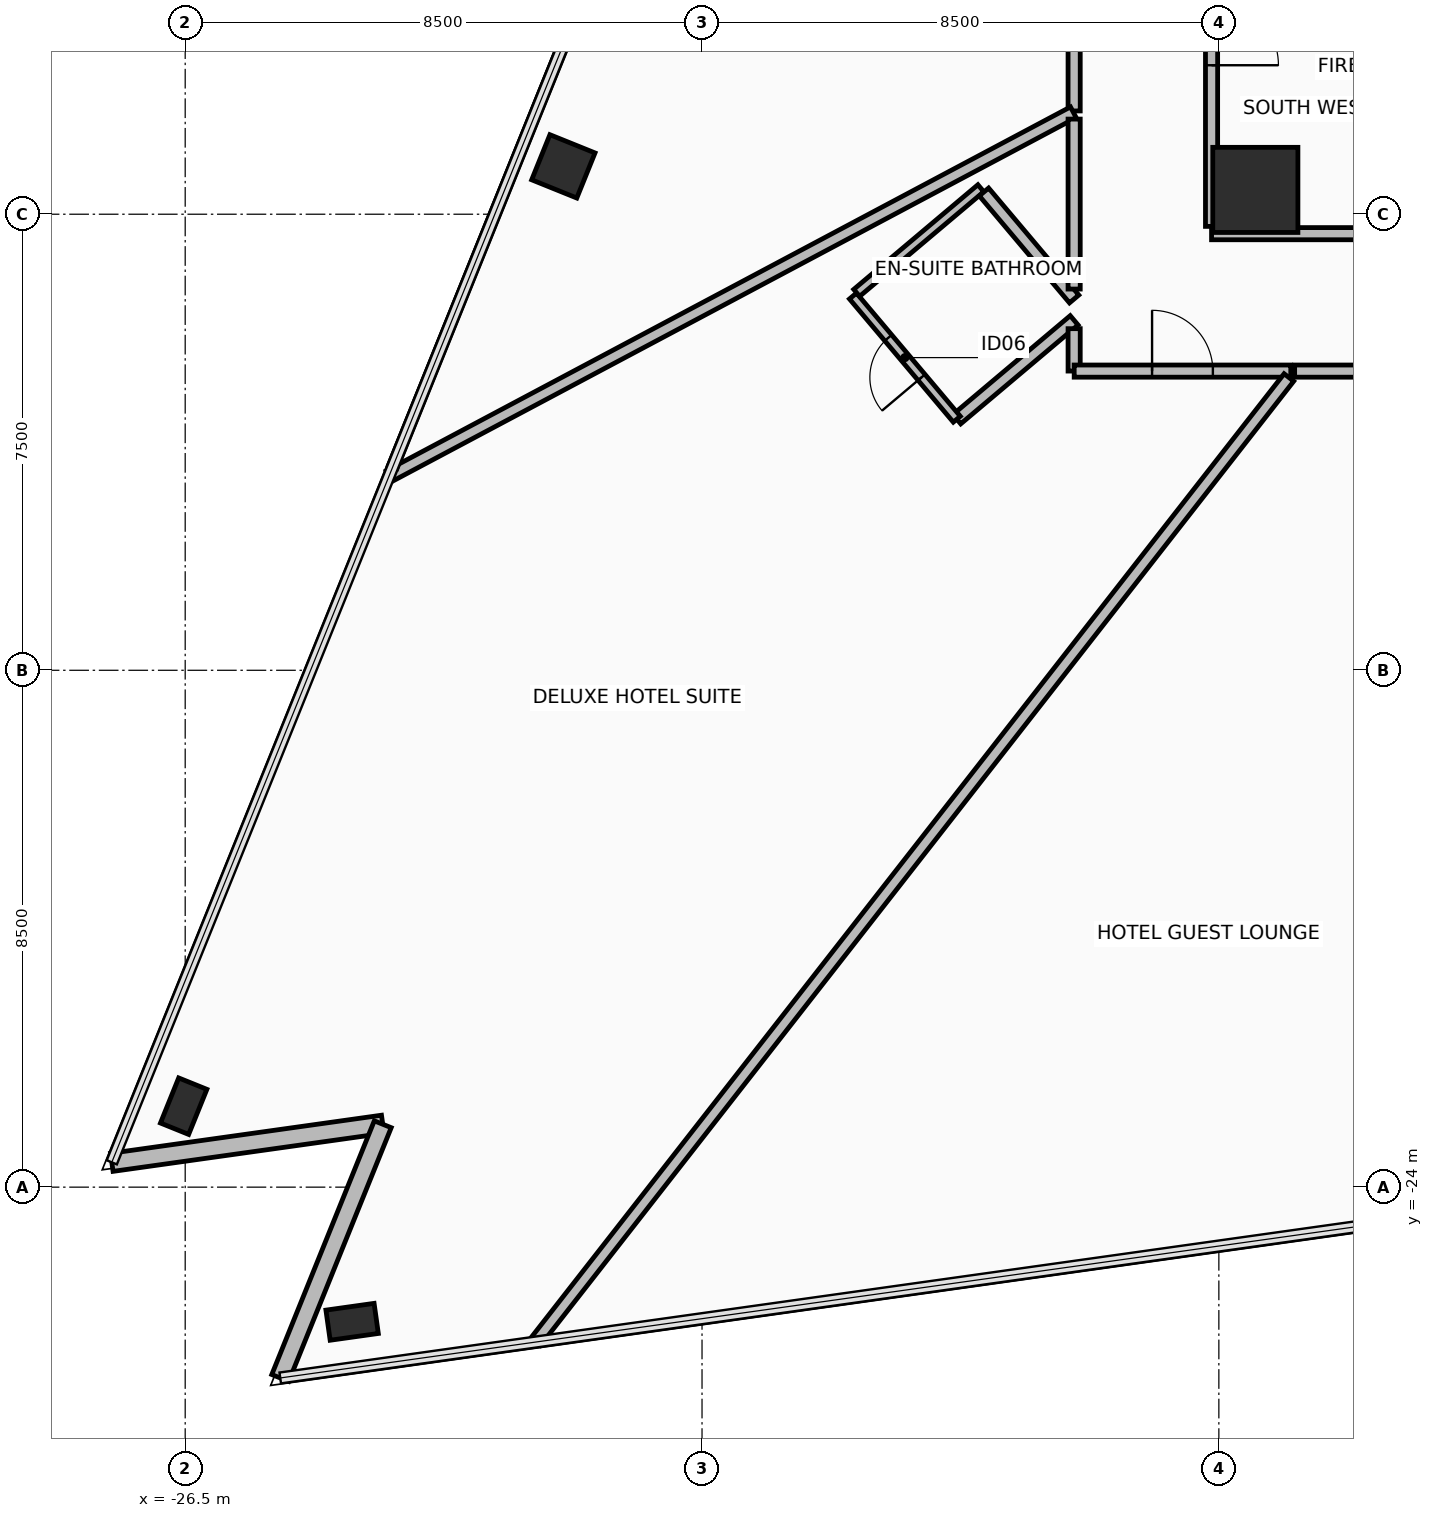
"""IFC4 building model, lengths in metres.
Left out: names, types, materials, properties, quantities, classifications, styles, units other than length and angle.
Written with IfcOpenShell. Run it as: python <this file> out.ifc"""

import sys

from ifc_helpers import new_model, si_unit, direction, frame, frame_2d, origin, origin_2d, place, context, subcontext, project, spatial, rectangle, hollow_rectangle, extrude, element, fill, save


model = new_model("IFC4")
c1 = context("Model", 3, precision=1e-05, world=origin(), true_north=direction((0.0, 1.0)))
c2 = subcontext(c1, "Body", "Model", "MODEL_VIEW")
j1 = project(units=[si_unit("LENGTHUNIT", "METRE"), si_unit("PLANEANGLEUNIT", "RADIAN")], contexts=[c1])
p1 = place(None, origin())
s1 = spatial("IfcSite", under=j1, at=p1, CompositionType="ELEMENT")
p2 = place(p1, origin())
s2 = spatial("IfcBuilding", under=s1, at=p2, CompositionType="ELEMENT")
p3 = place(p2, frame((0.0, 0.0, 67.3)))
s3 = spatial("IfcBuildingStorey", under=s2, at=p3, CompositionType="ELEMENT", Elevation=67.3)
p4 = place(p3, frame((-8.9, -7.6, 0.0), z_axis=(0.0, 0.0, 1.0), x_axis=(1.0, 0.0, 0.0)))
e1 = element("IfcColumn", 1, at=p4, inside=s3, PredefinedType="COLUMN", context=c2, shape_type="SweptSolid", body=[
    extrude(rectangle(XDim=1.4, YDim=1.4, at=origin_2d()), origin(), (0.0, 0.0, 1.0), 3.45),
])
p5 = place(p3, frame((-20.281, -7.213, 0.0), z_axis=(0.0, 0.0, 1.0), x_axis=(0.374608211656, 0.927183200754, 0.0)))
e2 = element("IfcColumn", 2, at=p5, inside=s3, PredefinedType="COLUMN", context=c2, shape_type="SweptSolid", body=[
    extrude(hollow_rectangle(XDim=0.8, YDim=0.8, WallThickness=0.045, at=origin_2d()), origin(), (0.0, 0.0, 1.0), 3.45),
])
for number, where, z_axis, x_axis in (
    (3, (-26.525, -22.668, 0.0), (0.0, 0.0, 1.0), (0.375, 0.927, 0.0)),
    (4, (-23.755, -26.214, 0.0), (0.0, 0.0, 1.0), (0.99, 0.139, 0.0)),
):
    element("IfcColumn", number, at=place(p3, frame(where, z_axis=z_axis, x_axis=x_axis)), inside=s3, PredefinedType="COLUMN", context=c2, shape_type="SweptSolid", body=[
        extrude(hollow_rectangle(XDim=0.5, YDim=0.8, WallThickness=0.04, at=origin_2d()), origin(), (0.0, 0.0, 1.0), 3.45),
    ])
p6 = place(p3, frame((-27.707, -23.592, 0.0), z_axis=(0.0, 0.0, 1.0), x_axis=(0.990269200152, 0.139165050317, 0.0)))
e5 = element("IfcWall", 5, at=p6, inside=s3, PredefinedType="STANDARD", context=c2, shape_type="SweptSolid", body=[
    extrude(rectangle(XDim=4.5, YDim=0.3, at=frame_2d((2.25, 0.0))), origin(), (0.0, 0.0, 1.0), 2.47),
])
p7 = place(p3, frame((-23.251, -22.966, 0.0), z_axis=(0.0, 0.0, 1.0), x_axis=(-0.374568898324, -0.927199083481, 0.0)))
e6 = element("IfcWall", 6, at=p7, inside=s3, PredefinedType="STANDARD", context=c2, shape_type="SweptSolid", body=[
    extrude(rectangle(XDim=4.5, YDim=0.3, at=frame_2d((2.25, 0.0))), origin(), (0.0, 0.0, 1.0), 2.47),
])
p8 = place(p3, frame((-9.62, -8.32, 0.0), z_axis=(0.0, 0.0, 1.0), x_axis=(1.0, 0.0, 0.0)))
e7 = element("IfcWall", 7, at=p8, inside=s3, PredefinedType="PARTITIONING", context=c2, shape_type="SweptSolid", body=[
    extrude(rectangle(XDim=19.24, YDim=0.2, at=frame_2d((9.62, 0.0))), origin(), (0.0, 0.0, 1.0), 2.67),
])
p9 = place(p8, frame((13.97, 0.0, 0.0)))
e8 = element("IfcOpeningElement", 8, at=p9, cuts=e7, PredefinedType="OPENING", context=c2, shape_type="SweptSolid", body=[
    extrude(rectangle(XDim=0.9, YDim=2.1, at=frame_2d((0.45, 1.05))), frame((0.0, 0.11, 0.0), z_axis=(0.0, -1.0, 0.0), x_axis=(1.0, 0.0, 0.0)), (0.0, 0.0, 1.0), 0.22),
])
p10 = place(p3, frame((-9.62, 8.2, 0.0), z_axis=(0.0, 0.0, 1.0), x_axis=(0.0, -1.0, 0.0)))
e9 = element("IfcWall", 9, at=p10, inside=s3, PredefinedType="PARTITIONING", context=c2, shape_type="SweptSolid", body=[
    extrude(rectangle(XDim=16.4, YDim=0.2, at=frame_2d((8.2, 0.0))), origin(), (0.0, 0.0, 1.0), 2.67),
])
p11 = place(p10, frame((12.65, 0.0, 0.0)))
e10 = element("IfcOpeningElement", 10, at=p11, cuts=e9, PredefinedType="OPENING", context=c2, shape_type="SweptSolid", body=[
    extrude(rectangle(XDim=1.1, YDim=2.15, at=frame_2d((0.55, 1.075))), frame((0.0, 0.11, 0.0), z_axis=(0.0, -1.0, 0.0), x_axis=(1.0, 0.0, 0.0)), (0.0, 0.0, 1.0), 0.22),
])
p12 = place(p3, frame((-11.88, -9.745, 0.0), z_axis=(0.0, 0.0, 1.0), x_axis=(-0.764712982519, -0.644371053328, 0.0)))
e11 = element("IfcWall", 11, at=p12, inside=s3, PredefinedType="PARTITIONING", context=c2, shape_type="SweptSolid", body=[
    extrude(rectangle(XDim=2.524, YDim=0.2, at=frame_2d((1.262, 0.0))), origin(), (0.0, 0.0, 1.0), 3.275),
])
p13 = place(p3, frame((-13.81, -11.371, 0.0), z_axis=(0.0, 0.0, 1.0), x_axis=(-0.644478981733, 0.764622025647, 0.0)))
e12 = element("IfcWall", 12, at=p13, inside=s3, PredefinedType="PARTITIONING", context=c2, shape_type="SweptSolid", body=[
    extrude(rectangle(XDim=2.65, YDim=0.15, at=frame_2d((1.325, 0.0))), origin(), (0.0, 0.0, 1.0), 2.87),
])
p14 = place(p13, frame((0.9, 0.0, 0.0)))
e13 = element("IfcOpeningElement", 13, at=p14, cuts=e12, PredefinedType="OPENING", context=c2, shape_type="SweptSolid", body=[
    extrude(rectangle(XDim=0.85, YDim=2.1, at=frame_2d((0.425, 1.05))), frame((0.0, 0.085, 0.0), z_axis=(0.0, -1.0, 0.0), x_axis=(1.0, 0.0, 0.0)), (0.0, 0.0, 1.0), 0.17),
])
p15 = place(p3, frame((-15.456, -9.293, 0.0), z_axis=(0.0, 0.0, 1.0), x_axis=(0.764709608169, 0.644375057846, 0.0)))
e14 = element("IfcWall", 14, at=p15, inside=s3, PredefinedType="PARTITIONING", context=c2, shape_type="SweptSolid", body=[
    extrude(rectangle(XDim=2.67, YDim=0.15, at=frame_2d((1.335, 0.0))), origin(), (0.0, 0.0, 1.0), 2.67),
])
p16 = place(p3, frame((-13.363, -7.634, 0.0), z_axis=(0.0, 0.0, 1.0), x_axis=(0.644400290836, -0.764688345125, 0.0)))
e15 = element("IfcWall", 15, at=p16, inside=s3, PredefinedType="PARTITIONING", context=c2, shape_type="SweptSolid", body=[
    extrude(rectangle(XDim=2.302, YDim=0.2, at=frame_2d((1.151, 0.0))), origin(), (0.0, 0.0, 1.0), 2.67),
])
p17 = place(p3, frame((-11.88, -0.857, 0.0), z_axis=(0.0, 0.0, 1.0), x_axis=(0.0, -1.0, 0.0)))
e16 = element("IfcWall", 16, at=p17, inside=s3, PredefinedType="PARTITIONING", context=c2, shape_type="SweptSolid", body=[
    extrude(rectangle(XDim=5.444, YDim=0.2, at=frame_2d((2.722, 0.0))), origin(), (0.0, 0.0, 1.0), 3.275),
])
p18 = place(p17, frame((2.297, 0.0, 0.0)))
e17 = element("IfcOpeningElement", 17, at=p18, cuts=e16, PredefinedType="OPENING", context=c2, shape_type="SweptSolid", body=[
    extrude(rectangle(XDim=0.85, YDim=2.1, at=frame_2d((0.425, 1.05))), frame((0.0, 0.11, 0.0), z_axis=(0.0, -1.0, 0.0), x_axis=(1.0, 0.0, 0.0)), (0.0, 0.0, 1.0), 0.22),
])
p19 = place(p3, frame((-11.893, -6.324, 0.0), z_axis=(0.0, 0.0, 1.0), x_axis=(-0.882946043117, -0.469474477416, 0.0)))
e18 = element("IfcWall", 18, at=p19, inside=s3, PredefinedType="PARTITIONING", context=c2, shape_type="SweptSolid", body=[
    extrude(rectangle(XDim=12.747, YDim=0.2, at=frame_2d((6.374, 0.0))), origin(), (0.0, 0.0, 1.0), 2.47),
])
p20 = place(p3, frame((-23.087, -12.156, 0.0), z_axis=(0.0, 0.0, 1.0), x_axis=(0.374605375648, 0.927184346576, 0.0)))
e19 = element("IfcWall", 19, at=p20, inside=s3, PredefinedType="PARTITIONING", context=c2, shape_type="SweptSolid", body=[
    extrude(rectangle(XDim=11.685, YDim=0.15, at=frame_2d((5.842, 0.0))), origin(), (0.0, 0.0, 1.0), 3.275),
])
p21 = place(p3, frame((-11.88, -6.436, 0.0), z_axis=(0.0, 0.0, 1.0), x_axis=(0.0, -1.0, 0.0)))
e20 = element("IfcWall", 20, at=p21, inside=s3, PredefinedType="PARTITIONING", context=c2, shape_type="SweptSolid", body=[
    extrude(rectangle(XDim=2.795, YDim=0.2, at=frame_2d((1.397, 0.0))), origin(), (0.0, 0.0, 1.0), 2.67),
])
p22 = place(p3, frame((-11.88, -9.882, 0.0), z_axis=(0.0, 0.0, 1.0), x_axis=(0.0, -1.0, 0.0)))
e21 = element("IfcWall", 21, at=p22, inside=s3, PredefinedType="PARTITIONING", context=c2, shape_type="SweptSolid", body=[
    extrude(rectangle(XDim=0.697, YDim=0.2, at=frame_2d((0.349, 0.0))), origin(), (0.0, 0.0, 1.0), 2.67),
])
p23 = place(p3, frame((-11.879, -10.58, 0.0), z_axis=(0.0, 0.0, 1.0), x_axis=(1.0, 0.0, 0.0)))
e22 = element("IfcWall", 22, at=p23, inside=s3, PredefinedType="PARTITIONING", context=c2, shape_type="SweptSolid", body=[
    extrude(rectangle(XDim=3.562, YDim=0.2, at=frame_2d((1.781, 0.0))), origin(), (0.0, 0.0, 1.0), 2.67),
])
p24 = place(p23, frame((1.281, 0.0, 0.0)))
e23 = element("IfcOpeningElement", 23, at=p24, cuts=e22, PredefinedType="OPENING", context=c2, shape_type="SweptSolid", body=[
    extrude(rectangle(XDim=1.0, YDim=2.15, at=frame_2d((0.5, 1.075))), frame((0.0, 0.11, 0.0), z_axis=(0.0, -1.0, 0.0), x_axis=(1.0, 0.0, 0.0)), (0.0, 0.0, 1.0), 0.22),
])
p25 = place(p3, frame((-8.348, -10.685, 0.0), z_axis=(0.0, 0.0, 1.0), x_axis=(-0.615661230884, -0.788010944585, 0.0)))
e24 = element("IfcWall", 24, at=p25, inside=s3, PredefinedType="PARTITIONING", context=c2, shape_type="SweptSolid", body=[
    extrude(rectangle(XDim=20.121, YDim=0.2, at=frame_2d((10.06, 0.0))), origin(), (0.0, 0.0, 1.0), 2.47),
])
p26 = place(p3, frame((-8.254, -10.58, 0.0), z_axis=(0.0, 0.0, 1.0), x_axis=(1.0, 0.0, 0.0)))
e25 = element("IfcWall", 25, at=p26, inside=s3, PredefinedType="PARTITIONING", context=c2, shape_type="SweptSolid", body=[
    extrude(rectangle(XDim=5.584, YDim=0.2, at=frame_2d((2.792, 0.0))), origin(), (0.0, 0.0, 1.0), 2.67),
])
p27 = place(p26, frame((2.192, 0.0, 0.0)))
e26 = element("IfcOpeningElement", 26, at=p27, cuts=e25, PredefinedType="OPENING", context=c2, shape_type="SweptSolid", body=[
    extrude(rectangle(XDim=1.2, YDim=2.15, at=frame_2d((0.6, 1.075))), frame((0.0, 0.11, 0.0), z_axis=(0.0, -1.0, 0.0), x_axis=(1.0, 0.0, 0.0)), (0.0, 0.0, 1.0), 0.22),
])
p28 = place(p11, frame((1.1, 0.0, 0.0), z_axis=(0.0, 0.0, 1.0), x_axis=(-1.0, 0.0, 0.0)))
e27 = element("IfcDoor", 27, at=p28, inside=s3, OperationType="SINGLE_SWING_LEFT", PredefinedType="DOOR", context=c2, shape_type="SweptSolid", body=[
    extrude(rectangle(XDim=1.1, YDim=2.15, at=frame_2d((0.55, 1.075))), frame((0.0, 0.025, 0.0), z_axis=(0.0, -1.0, 0.0), x_axis=(1.0, 0.0, 0.0)), (0.0, 0.0, 1.0), 0.05),
])
fill(e10, e27)
p29 = place(p14, origin())
e28 = element("IfcDoor", 28, at=p29, inside=s3, OperationType="SINGLE_SWING_RIGHT", PredefinedType="DOOR", context=c2, shape_type="SweptSolid", body=[
    extrude(rectangle(XDim=0.85, YDim=2.1, at=frame_2d((0.425, 1.05))), frame((0.0, 0.025, 0.0), z_axis=(0.0, -1.0, 0.0), x_axis=(1.0, 0.0, 0.0)), (0.0, 0.0, 1.0), 0.05),
])
fill(e13, e28)
p30 = place(p24, origin())
e29 = element("IfcDoor", 29, at=p30, inside=s3, OperationType="SINGLE_SWING_LEFT", PredefinedType="DOOR", context=c2, shape_type="SweptSolid", body=[
    extrude(rectangle(XDim=1.0, YDim=2.15, at=frame_2d((0.5, 1.075))), frame((0.0, 0.025, 0.0), z_axis=(0.0, -1.0, 0.0), x_axis=(1.0, 0.0, 0.0)), (0.0, 0.0, 1.0), 0.05),
])
fill(e23, e29)
save(model, sys.argv[1])
